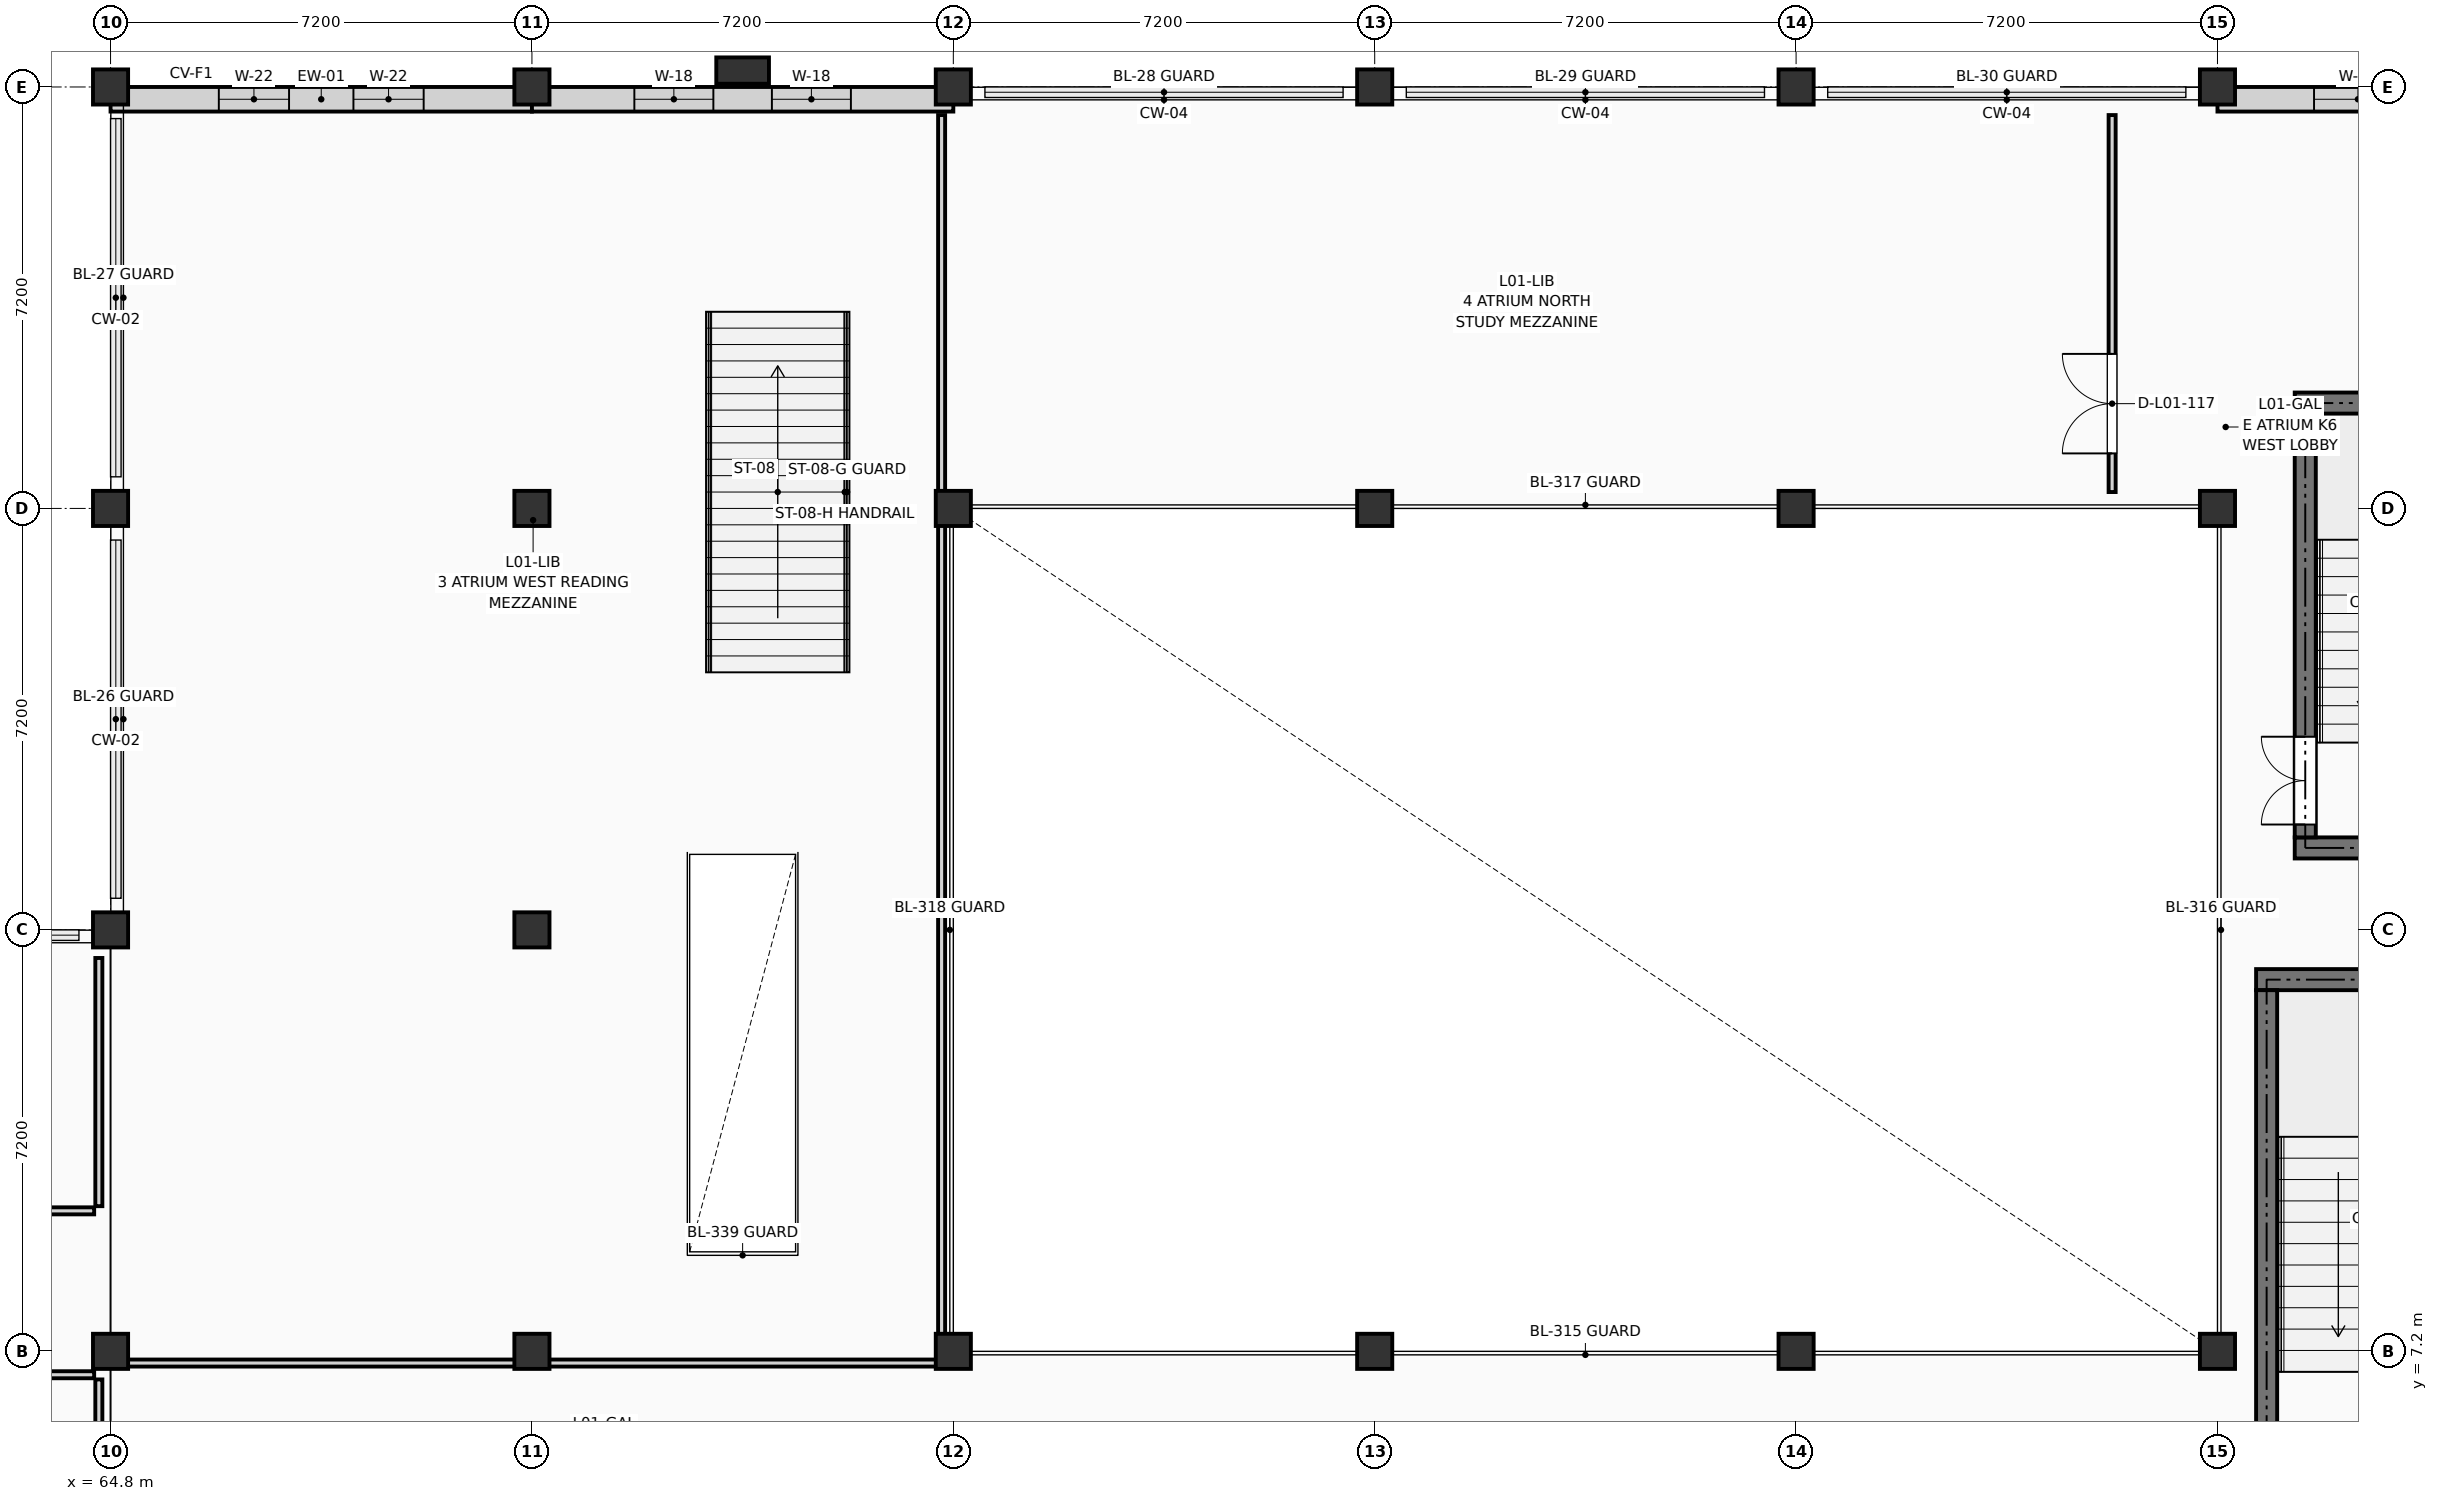
"""IFC4 building model, lengths in metres.
Left out: names, types, materials, properties, quantities, classifications, styles, units other than length and angle.
Written with IfcOpenShell. Run it as: python <this file> out.ifc"""

import sys

from ifc_helpers import new_model, si_unit, direction, frame, frame_2d, origin, origin_2d, place, context, subcontext, project, spatial, rectangle, extrude, element, fill, save


model = new_model("IFC4")
c1 = context("Model", 3, precision=1e-05, world=origin(), true_north=direction((0.0, 1.0)))
c2 = subcontext(c1, "Body", "Model", "MODEL_VIEW")
j1 = project(units=[si_unit("LENGTHUNIT", "METRE"), si_unit("PLANEANGLEUNIT", "RADIAN")], contexts=[c1])
p1 = place(None, origin())
s1 = spatial("IfcSite", under=j1, at=p1, CompositionType="ELEMENT")
p2 = place(p1, origin())
s2 = spatial("IfcBuilding", under=s1, at=p2, CompositionType="ELEMENT")
p3 = place(p2, frame((0.0, 0.0, 4.5)))
s3 = spatial("IfcBuildingStorey", under=s2, at=p3, CompositionType="ELEMENT", Elevation=4.5)
for number, where, z_axis, x_axis in (
    (1, (64.8, 7.2, 0.0), (0.0, 0.0, 1.0), (1.0, 0.0, 0.0)),
    (2, (64.8, 14.4, 0.0), (0.0, 0.0, 1.0), (1.0, 0.0, 0.0)),
    (3, (64.8, 21.6, 0.0), (0.0, 0.0, 1.0), (1.0, 0.0, 0.0)),
    (4, (64.8, 28.8, 0.0), (0.0, 0.0, 1.0), (1.0, 0.0, 0.0)),
    (5, (72.0, 7.2, 0.0), (0.0, 0.0, 1.0), (1.0, 0.0, 0.0)),
    (6, (72.0, 14.4, 0.0), (0.0, 0.0, 1.0), (1.0, 0.0, 0.0)),
    (7, (72.0, 21.6, 0.0), (0.0, 0.0, 1.0), (1.0, 0.0, 0.0)),
    (8, (72.0, 28.8, 0.0), (0.0, 0.0, 1.0), (1.0, 0.0, 0.0)),
    (9, (79.2, 7.2, 0.0), (0.0, 0.0, 1.0), (1.0, 0.0, 0.0)),
    (10, (79.2, 21.6, 0.0), (0.0, 0.0, 1.0), (1.0, 0.0, 0.0)),
    (11, (79.2, 28.8, 0.0), (0.0, 0.0, 1.0), (1.0, 0.0, 0.0)),
    (12, (86.4, 7.2, 0.0), (0.0, 0.0, 1.0), (1.0, 0.0, 0.0)),
    (13, (86.4, 21.6, 0.0), (0.0, 0.0, 1.0), (1.0, 0.0, 0.0)),
    (14, (86.4, 28.8, 0.0), (0.0, 0.0, 1.0), (1.0, 0.0, 0.0)),
    (15, (93.6, 7.2, 0.0), (0.0, 0.0, 1.0), (1.0, 0.0, 0.0)),
    (16, (93.6, 21.6, 0.0), (0.0, 0.0, 1.0), (1.0, 0.0, 0.0)),
    (17, (93.6, 28.8, 0.0), (0.0, 0.0, 1.0), (1.0, 0.0, 0.0)),
    (18, (100.8, 7.2, 0.0), (0.0, 0.0, 1.0), (1.0, 0.0, 0.0)),
    (19, (100.8, 21.6, 0.0), (0.0, 0.0, 1.0), (1.0, 0.0, 0.0)),
    (20, (100.8, 28.8, 0.0), (0.0, 0.0, 1.0), (1.0, 0.0, 0.0)),
):
    element("IfcColumn", number, at=place(p3, frame(where, z_axis=z_axis, x_axis=x_axis)), inside=s3, PredefinedType="COLUMN", context=c2, shape_type="SweptSolid", body=[
        extrude(rectangle(XDim=0.6, YDim=0.6, at=origin_2d()), origin(), (0.0, 0.0, 1.0), 4.05),
    ])
p4 = place(p3, frame((75.6, 29.08, 0.0), z_axis=(0.0, 0.0, 1.0), x_axis=(0.0, 1.0, 0.0)))
e21 = element("IfcColumn", 21, at=p4, inside=s3, PredefinedType="PILASTER", context=c2, shape_type="SweptSolid", body=[
    extrude(rectangle(XDim=0.45, YDim=0.9, at=origin_2d()), origin(), (0.0, 0.0, 1.0), 4.05),
])
p5 = place(p3, frame((64.8, 28.59, 0.0), z_axis=(0.0, 0.0, 1.0), x_axis=(1.0, 0.0, 0.0)))
e22 = element("IfcWall", 22, at=p5, inside=s3, PredefinedType="SOLIDWALL", context=c2, shape_type="SweptSolid", body=[
    extrude(rectangle(XDim=7.2, YDim=0.42, at=frame_2d((3.6, 0.0))), origin(), (0.0, 0.0, 1.0), 3.16),
])
p6 = place(p5, frame((1.85, 0.0, 0.45)))
e23 = element("IfcOpeningElement", 23, at=p6, cuts=e22, PredefinedType="OPENING", context=c2, shape_type="SweptSolid", body=[
    extrude(rectangle(XDim=1.2, YDim=2.35, at=frame_2d((0.6, 1.175))), frame((0.0, 0.222, 0.0), z_axis=(0.0, -1.0, 0.0), x_axis=(1.0, 0.0, 0.0)), (0.0, 0.0, 1.0), 0.444),
])
p7 = place(p5, frame((4.15, 0.0, 0.45)))
e24 = element("IfcOpeningElement", 24, at=p7, cuts=e22, PredefinedType="OPENING", context=c2, shape_type="SweptSolid", body=[
    extrude(rectangle(XDim=1.2, YDim=2.35, at=frame_2d((0.6, 1.175))), frame((0.0, 0.222, 0.0), z_axis=(0.0, -1.0, 0.0), x_axis=(1.0, 0.0, 0.0)), (0.0, 0.0, 1.0), 0.444),
])
p8 = place(p3, frame((72.0, 28.59, 0.0), z_axis=(0.0, 0.0, 1.0), x_axis=(1.0, 0.0, 0.0)))
e25 = element("IfcWall", 25, at=p8, inside=s3, PredefinedType="SOLIDWALL", context=c2, shape_type="SweptSolid", body=[
    extrude(rectangle(XDim=7.2, YDim=0.42, at=frame_2d((3.6, 0.0))), origin(), (0.0, 0.0, 1.0), 3.16),
])
p9 = place(p8, frame((1.75, 0.0, 0.45)))
e26 = element("IfcOpeningElement", 26, at=p9, cuts=e25, PredefinedType="OPENING", context=c2, shape_type="SweptSolid", body=[
    extrude(rectangle(XDim=1.35, YDim=2.45, at=frame_2d((0.675, 1.225))), frame((0.0, 0.222, 0.0), z_axis=(0.0, -1.0, 0.0), x_axis=(1.0, 0.0, 0.0)), (0.0, 0.0, 1.0), 0.444),
])
p10 = place(p8, frame((4.1, 0.0, 0.45)))
e27 = element("IfcOpeningElement", 27, at=p10, cuts=e25, PredefinedType="OPENING", context=c2, shape_type="SweptSolid", body=[
    extrude(rectangle(XDim=1.35, YDim=2.45, at=frame_2d((0.675, 1.225))), frame((0.0, 0.222, 0.0), z_axis=(0.0, -1.0, 0.0), x_axis=(1.0, 0.0, 0.0)), (0.0, 0.0, 1.0), 0.444),
])
p11 = place(p3, frame((100.8, 28.59, 0.0), z_axis=(0.0, 0.0, 1.0), x_axis=(1.0, 0.0, 0.0)))
e28 = element("IfcWall", 28, at=p11, inside=s3, PredefinedType="SOLIDWALL", context=c2, shape_type="SweptSolid", body=[
    extrude(rectangle(XDim=7.2, YDim=0.42, at=frame_2d((3.6, 0.0))), origin(), (0.0, 0.0, 1.0), 3.16),
])
p12 = place(p11, frame((1.65, 0.0, 0.45)))
e29 = element("IfcOpeningElement", 29, at=p12, cuts=e28, PredefinedType="OPENING", context=c2, shape_type="SweptSolid", body=[
    extrude(rectangle(XDim=1.5, YDim=2.4, at=frame_2d((0.75, 1.2))), frame((0.0, 0.222, 0.0), z_axis=(0.0, -1.0, 0.0), x_axis=(1.0, 0.0, 0.0)), (0.0, 0.0, 1.0), 0.444),
])
p13 = place(p11, frame((4.05, 0.0, 0.45)))
e30 = element("IfcOpeningElement", 30, at=p13, cuts=e28, PredefinedType="OPENING", context=c2, shape_type="SweptSolid", body=[
    extrude(rectangle(XDim=1.5, YDim=2.4, at=frame_2d((0.75, 1.2))), frame((0.0, 0.222, 0.0), z_axis=(0.0, -1.0, 0.0), x_axis=(1.0, 0.0, 0.0)), (0.0, 0.0, 1.0), 0.444),
])
for number, where, z_axis, x_axis in (
    (31, (102.12, 15.8, 0.0), (0.0, 0.0, 1.0), (1.0, 0.0, 0.0)),
    (32, (102.12, 23.4, 0.0), (0.0, 0.0, 1.0), (1.0, 0.0, 0.0)),
):
    element("IfcWall", number, at=place(p3, frame(where, z_axis=z_axis, x_axis=x_axis)), inside=s3, PredefinedType="SHEAR", context=c2, shape_type="SweptSolid", body=[
        extrude(rectangle(XDim=4.48, YDim=0.36, at=frame_2d((2.24, 0.0))), origin(), (0.0, 0.0, 1.0), 3.79),
    ])
p14 = place(p3, frame((102.3, 15.98, 0.0), z_axis=(0.0, 0.0, 1.0), x_axis=(0.0, 1.0, 0.0)))
e33 = element("IfcWall", 33, at=p14, inside=s3, PredefinedType="SHEAR", context=c2, shape_type="SweptSolid", body=[
    extrude(rectangle(XDim=7.24, YDim=0.36, at=frame_2d((3.62, 0.0))), origin(), (0.0, 0.0, 1.0), 3.79),
])
p15 = place(p14, frame((0.22, 0.0, 0.0)))
e34 = element("IfcOpeningElement", 34, at=p15, cuts=e33, PredefinedType="OPENING", context=c2, shape_type="SweptSolid", body=[
    extrude(rectangle(XDim=1.5, YDim=2.2, at=frame_2d((0.75, 1.1))), frame((0.0, 0.192, 0.0), z_axis=(0.0, -1.0, 0.0), x_axis=(1.0, 0.0, 0.0)), (0.0, 0.0, 1.0), 0.384),
])
p16 = place(p3, frame((101.46, 13.55, 0.0), z_axis=(0.0, 0.0, 1.0), x_axis=(1.0, 0.0, 0.0)))
e35 = element("IfcWall", 35, at=p16, inside=s3, PredefinedType="SHEAR", context=c2, shape_type="SweptSolid", body=[
    extrude(rectangle(XDim=5.88, YDim=0.36, at=frame_2d((2.94, 0.0))), origin(), (0.0, 0.0, 1.0), 3.79),
])
p17 = place(p3, frame((101.64, 4.78, 0.0), z_axis=(0.0, 0.0, 1.0), x_axis=(0.0, 1.0, 0.0)))
e36 = element("IfcWall", 36, at=p17, inside=s3, PredefinedType="SHEAR", context=c2, shape_type="SweptSolid", body=[
    extrude(rectangle(XDim=8.59, YDim=0.36, at=frame_2d((4.295, 0.0))), origin(), (0.0, 0.0, 1.0), 3.79),
])
p18 = place(p3, frame((64.6, 0.48, 0.0), z_axis=(0.0, 0.0, 1.0), x_axis=(0.0, 1.0, 0.0)))
e37 = element("IfcWall", 37, at=p18, inside=s3, PredefinedType="PARTITIONING", context=c2, shape_type="SweptSolid", body=[
    extrude(rectangle(XDim=6.24, YDim=0.12, at=frame_2d((3.12, 0.0))), origin(), (0.0, 0.0, 1.0), 2.925),
])
p19 = place(p3, frame((48.08, 6.8, 0.0), z_axis=(0.0, 0.0, 1.0), x_axis=(1.0, 0.0, 0.0)))
e38 = element("IfcWall", 38, at=p19, inside=s3, PredefinedType="PARTITIONING", context=c2, shape_type="SweptSolid", body=[
    extrude(rectangle(XDim=16.44, YDim=0.12, at=frame_2d((8.22, 0.0))), origin(), (0.0, 0.0, 1.0), 3.025),
])
p20 = place(p19, frame((6.031, 0.0, 0.0)))
e39 = element("IfcOpeningElement", 39, at=p20, cuts=e38, PredefinedType="OPENING", context=c2, shape_type="SweptSolid", body=[
    extrude(rectangle(XDim=1.32, YDim=2.2, at=frame_2d((0.66, 1.1))), frame((0.0, 0.072, 0.0), z_axis=(0.0, -1.0, 0.0), x_axis=(1.0, 0.0, 0.0)), (0.0, 0.0, 1.0), 0.144),
])
p21 = place(p3, frame((20.48, 9.6, 0.0), z_axis=(0.0, 0.0, 1.0), x_axis=(1.0, 0.0, 0.0)))
e40 = element("IfcWall", 40, at=p21, inside=s3, PredefinedType="PARTITIONING", context=c2, shape_type="SweptSolid", body=[
    extrude(rectangle(XDim=44.04, YDim=0.12, at=frame_2d((22.02, 0.0))), origin(), (0.0, 0.0, 1.0), 3.775),
])
p22 = place(p21, frame((20.479, 0.0, 0.0)))
e41 = element("IfcOpeningElement", 41, at=p22, cuts=e40, PredefinedType="OPENING", context=c2, shape_type="SweptSolid", body=[
    extrude(rectangle(XDim=1.32, YDim=2.2, at=frame_2d((0.66, 1.1))), frame((0.0, 0.072, 0.0), z_axis=(0.0, -1.0, 0.0), x_axis=(1.0, 0.0, 0.0)), (0.0, 0.0, 1.0), 0.144),
])
p23 = place(p3, frame((64.6, 9.68, 0.0), z_axis=(0.0, 0.0, 1.0), x_axis=(0.0, 1.0, 0.0)))
e42 = element("IfcWall", 42, at=p23, inside=s3, PredefinedType="PARTITIONING", context=c2, shape_type="SweptSolid", body=[
    extrude(rectangle(XDim=4.24, YDim=0.12, at=frame_2d((2.12, 0.0))), origin(), (0.0, 0.0, 1.0), 2.925),
])
p24 = place(p3, frame((64.88, 7.0, 0.0), z_axis=(0.0, 0.0, 1.0), x_axis=(1.0, 0.0, 0.0)))
e43 = element("IfcWall", 43, at=p24, inside=s3, PredefinedType="PARTITIONING", context=c2, shape_type="SweptSolid", body=[
    extrude(rectangle(XDim=14.04, YDim=0.12, at=frame_2d((7.02, 0.0))), origin(), (0.0, 0.0, 1.0), 3.025),
])
p25 = place(p3, frame((79.0, 7.08, 0.0), z_axis=(0.0, 0.0, 1.0), x_axis=(0.0, 1.0, 0.0)))
e44 = element("IfcWall", 44, at=p25, inside=s3, PredefinedType="PARTITIONING", context=c2, shape_type="SweptSolid", body=[
    extrude(rectangle(XDim=21.24, YDim=0.12, at=frame_2d((10.62, 0.0))), origin(), (0.0, 0.0, 1.0), 3.775),
])
p26 = place(p3, frame((99.0, 21.88, 0.0), z_axis=(0.0, 0.0, 1.0), x_axis=(0.0, 1.0, 0.0)))
e45 = element("IfcWall", 45, at=p26, inside=s3, PredefinedType="PARTITIONING", context=c2, shape_type="SweptSolid", body=[
    extrude(rectangle(XDim=6.44, YDim=0.12, at=frame_2d((3.22, 0.0))), origin(), (0.0, 0.0, 1.0), 3.775),
])
p27 = place(p26, frame((0.66, 0.0, 0.0)))
e46 = element("IfcOpeningElement", 46, at=p27, cuts=e45, PredefinedType="OPENING", context=c2, shape_type="SweptSolid", body=[
    extrude(rectangle(XDim=1.7, YDim=2.28, at=frame_2d((0.85, 1.14))), frame((0.0, 0.072, 0.0), z_axis=(0.0, -1.0, 0.0), x_axis=(1.0, 0.0, 0.0)), (0.0, 0.0, 1.0), 0.144),
])
p28 = place(p6, origin())
e47 = element("IfcWindow", 47, at=p28, inside=s3, PartitioningType="SINGLE_PANEL", PredefinedType="WINDOW", context=c2, shape_type="SweptSolid", body=[
    extrude(rectangle(XDim=1.2, YDim=2.35, at=frame_2d((0.6, 1.175))), frame((0.0, 0.03, 0.0), z_axis=(0.0, -1.0, 0.0), x_axis=(1.0, 0.0, 0.0)), (0.0, 0.0, 1.0), 0.06),
])
fill(e23, e47)
p29 = place(p7, origin())
e48 = element("IfcWindow", 48, at=p29, inside=s3, PartitioningType="SINGLE_PANEL", PredefinedType="WINDOW", context=c2, shape_type="SweptSolid", body=[
    extrude(rectangle(XDim=1.2, YDim=2.35, at=frame_2d((0.6, 1.175))), frame((0.0, 0.03, 0.0), z_axis=(0.0, -1.0, 0.0), x_axis=(1.0, 0.0, 0.0)), (0.0, 0.0, 1.0), 0.06),
])
fill(e24, e48)
p30 = place(p9, origin())
e49 = element("IfcWindow", 49, at=p30, inside=s3, PartitioningType="SINGLE_PANEL", PredefinedType="WINDOW", context=c2, shape_type="SweptSolid", body=[
    extrude(rectangle(XDim=1.35, YDim=2.45, at=frame_2d((0.675, 1.225))), frame((0.0, 0.03, 0.0), z_axis=(0.0, -1.0, 0.0), x_axis=(1.0, 0.0, 0.0)), (0.0, 0.0, 1.0), 0.06),
])
fill(e26, e49)
p31 = place(p10, origin())
e50 = element("IfcWindow", 50, at=p31, inside=s3, PartitioningType="SINGLE_PANEL", PredefinedType="WINDOW", context=c2, shape_type="SweptSolid", body=[
    extrude(rectangle(XDim=1.35, YDim=2.45, at=frame_2d((0.675, 1.225))), frame((0.0, 0.03, 0.0), z_axis=(0.0, -1.0, 0.0), x_axis=(1.0, 0.0, 0.0)), (0.0, 0.0, 1.0), 0.06),
])
fill(e27, e50)
p32 = place(p12, origin())
e51 = element("IfcWindow", 51, at=p32, inside=s3, PartitioningType="SINGLE_PANEL", PredefinedType="WINDOW", context=c2, shape_type="SweptSolid", body=[
    extrude(rectangle(XDim=1.5, YDim=2.4, at=frame_2d((0.75, 1.2))), frame((0.0, 0.03, 0.0), z_axis=(0.0, -1.0, 0.0), x_axis=(1.0, 0.0, 0.0)), (0.0, 0.0, 1.0), 0.06),
])
fill(e29, e51)
p33 = place(p15, origin())
e52 = element("IfcDoor", 52, at=p33, inside=s3, OperationType="DOUBLE_DOOR_SINGLE_SWING", PredefinedType="DOOR", context=c2, shape_type="SweptSolid", body=[
    extrude(rectangle(XDim=1.5, YDim=2.2, at=frame_2d((0.75, 1.1))), frame((0.0, 0.025, 0.0), z_axis=(0.0, -1.0, 0.0), x_axis=(1.0, 0.0, 0.0)), (0.0, 0.0, 1.0), 0.05),
])
fill(e34, e52)
p34 = place(p27, origin())
e53 = element("IfcDoor", 53, at=p34, inside=s3, OperationType="DOUBLE_DOOR_SINGLE_SWING", PredefinedType="DOOR", context=c2, shape_type="SweptSolid", body=[
    extrude(rectangle(XDim=1.7, YDim=2.28, at=frame_2d((0.85, 1.14))), frame((0.0, 0.025, 0.0), z_axis=(0.0, -1.0, 0.0), x_axis=(1.0, 0.0, 0.0)), (0.0, 0.0, 1.0), 0.05),
])
fill(e46, e53)
save(model, sys.argv[1])
